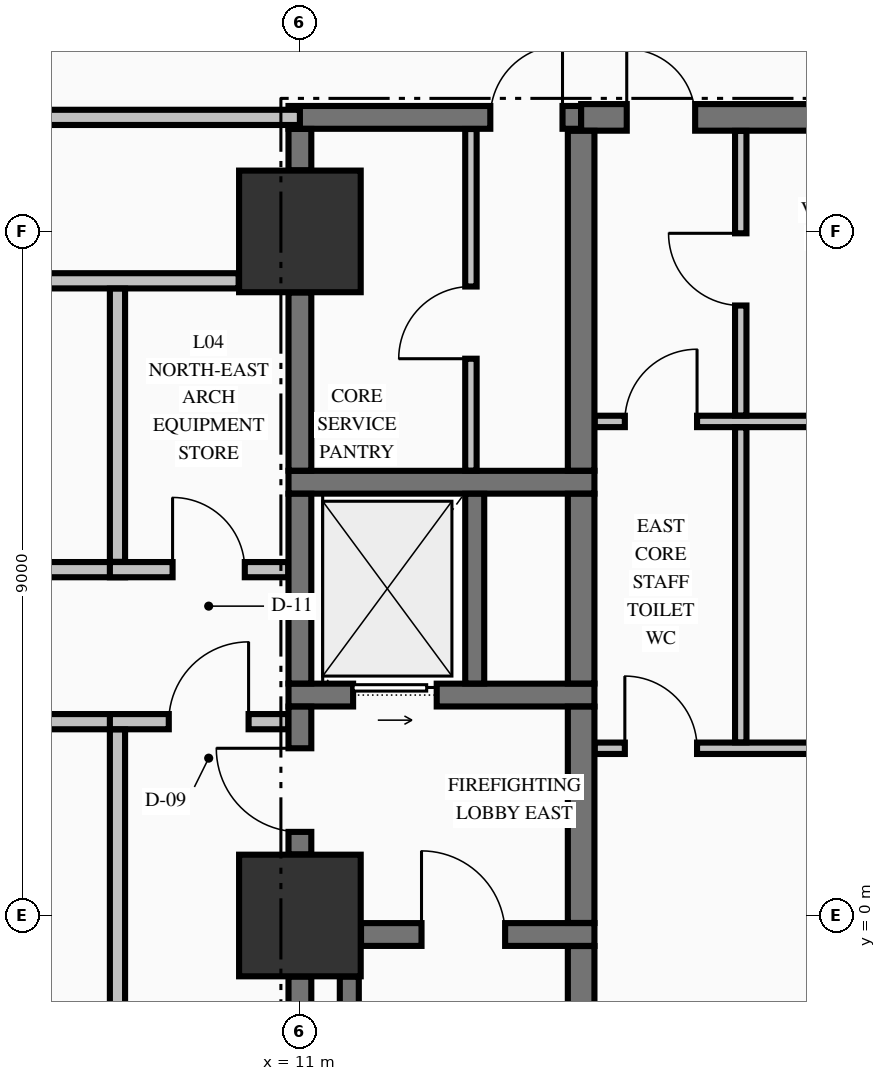
"""IFC4 building model, lengths in metres.
Left out: names, types, materials, properties, quantities, classifications, styles, units other than length and angle.
Written with IfcOpenShell. Run it as: python <this file> out.ifc"""

import sys

from ifc_helpers import new_model, si_unit, direction, frame, frame_2d, origin, origin_2d, place, context, subcontext, project, spatial, rectangle, extrude, element, fill, save


model = new_model("IFC4")
c1 = context("Model", 3, precision=1e-05, world=origin(), true_north=direction((0.0, 1.0)))
c2 = subcontext(c1, "Body", "Model", "MODEL_VIEW")
j1 = project(units=[si_unit("LENGTHUNIT", "METRE"), si_unit("PLANEANGLEUNIT", "RADIAN")], contexts=[c1])
p1 = place(None, origin())
s1 = spatial("IfcSite", under=j1, at=p1, CompositionType="ELEMENT")
p2 = place(p1, origin())
s2 = spatial("IfcBuilding", under=s1, at=p2, CompositionType="ELEMENT")
p3 = place(p2, frame((0.0, 0.0, 21.76)))
s3 = spatial("IfcBuildingStorey", under=s2, at=p3, CompositionType="ELEMENT", Elevation=21.76)
for number, where, z_axis, x_axis in (
    (1, (11.0, 0.0, -0.45), (0.0, 0.0, 1.0), (1.0, 0.0, 0.0)),
    (2, (11.0, 9.0, -0.45), (0.0, 0.0, 1.0), (1.0, 0.0, 0.0)),
):
    element("IfcColumn", number, at=place(p3, frame(where, z_axis=z_axis, x_axis=x_axis)), inside=s3, PredefinedType="COLUMN", context=c2, shape_type="SweptSolid", body=[
        extrude(rectangle(XDim=1.6, YDim=1.6, at=origin_2d()), origin(), (0.0, 0.0, 1.0), 5.44),
    ])
p4 = place(p3, frame((11.804, -0.25, 0.0), z_axis=(0.0, 0.0, 1.0), x_axis=(1.0, 0.0, 0.0)))
e3 = element("IfcWall", 3, at=p4, inside=s3, PredefinedType="SHEAR", context=c2, shape_type="SweptSolid", body=[
    extrude(rectangle(XDim=3.071, YDim=0.3, at=frame_2d((1.536, 0.0))), origin(), (0.0, 0.0, 1.0), 4.99),
])
p5 = place(p4, frame((0.796, 0.0, 0.0)))
e4 = element("IfcOpeningElement", 4, at=p5, cuts=e3, PredefinedType="OPENING", context=c2, shape_type="SweptSolid", body=[
    extrude(rectangle(XDim=1.1, YDim=2.15, at=frame_2d((0.55, 1.075))), frame((0.0, 0.16, 0.0), z_axis=(0.0, -1.0, 0.0), x_axis=(1.0, 0.0, 0.0)), (0.0, 0.0, 1.0), 0.32),
])
p6 = place(p3, frame((10.85, 2.9, 0.0), z_axis=(0.0, 0.0, 1.0), x_axis=(1.0, 0.0, 0.0)))
e5 = element("IfcWall", 5, at=p6, inside=s3, PredefinedType="SHEAR", context=c2, shape_type="SweptSolid", body=[
    extrude(rectangle(XDim=4.025, YDim=0.3, at=frame_2d((2.012, 0.0))), origin(), (0.0, 0.0, 1.0), 4.99),
])
p7 = place(p6, frame((0.85, 0.0, 0.0)))
e6 = element("IfcOpeningElement", 6, at=p7, cuts=e5, PredefinedType="OPENING", context=c2, shape_type="SweptSolid", body=[
    extrude(rectangle(XDim=1.1, YDim=2.2, at=frame_2d((0.55, 1.1))), frame((0.0, 0.16, 0.0), z_axis=(0.0, -1.0, 0.0), x_axis=(1.0, 0.0, 0.0)), (0.0, 0.0, 1.0), 0.32),
])
p8 = place(p3, frame((10.85, 5.7, 0.0), z_axis=(0.0, 0.0, 1.0), x_axis=(1.0, 0.0, 0.0)))
e7 = element("IfcWall", 7, at=p8, inside=s3, PredefinedType="SHEAR", context=c2, shape_type="SweptSolid", body=[
    extrude(rectangle(XDim=4.025, YDim=0.3, at=frame_2d((2.012, 0.0))), origin(), (0.0, 0.0, 1.0), 4.99),
])
p9 = place(p3, frame((10.85, 10.5, 0.0), z_axis=(0.0, 0.0, 1.0), x_axis=(1.0, 0.0, 0.0)))
e8 = element("IfcWall", 8, at=p9, inside=s3, PredefinedType="SHEAR", context=c2, shape_type="SweptSolid", body=[
    extrude(rectangle(XDim=3.85, YDim=0.3, at=frame_2d((1.925, 0.0))), origin(), (0.0, 0.0, 1.0), 4.99),
])
p10 = place(p9, frame((2.655, 0.0, 0.0)))
e9 = element("IfcOpeningElement", 9, at=p10, cuts=e8, PredefinedType="OPENING", context=c2, shape_type="SweptSolid", body=[
    extrude(rectangle(XDim=0.95, YDim=2.15, at=frame_2d((0.475, 1.075))), frame((0.0, 0.16, 0.0), z_axis=(0.0, -1.0, 0.0), x_axis=(1.0, 0.0, 0.0)), (0.0, 0.0, 1.0), 0.32),
])
p11 = place(p3, frame((14.7, 10.5, 0.0), z_axis=(0.0, 0.0, 1.0), x_axis=(1.0, 0.0, 0.0)))
e10 = element("IfcWall", 10, at=p11, inside=s3, PredefinedType="SHEAR", context=c2, shape_type="SweptSolid", body=[
    extrude(rectangle(XDim=5.475, YDim=0.35, at=frame_2d((2.738, 0.0))), origin(), (0.0, 0.0, 1.0), 4.99),
])
p12 = place(p11, frame((0.6, 0.0, 0.0)))
e11 = element("IfcOpeningElement", 11, at=p12, cuts=e10, PredefinedType="OPENING", context=c2, shape_type="SweptSolid", body=[
    extrude(rectangle(XDim=0.9, YDim=2.15, at=frame_2d((0.45, 1.075))), frame((0.0, 0.185, 0.0), z_axis=(0.0, -1.0, 0.0), x_axis=(1.0, 0.0, 0.0)), (0.0, 0.0, 1.0), 0.37),
])
p13 = place(p3, frame((14.878, 2.2, 0.0), z_axis=(0.0, 0.0, 1.0), x_axis=(1.0, 0.0, 0.0)))
e12 = element("IfcWall", 12, at=p13, inside=s3, PredefinedType="PARTITIONING", context=c2, shape_type="SweptSolid", body=[
    extrude(rectangle(XDim=4.944, YDim=0.15, at=frame_2d((2.472, 0.0))), origin(), (0.0, 0.0, 1.0), 4.99),
])
p14 = place(p13, frame((0.397, 0.0, 0.0)))
e13 = element("IfcOpeningElement", 13, at=p14, cuts=e12, PredefinedType="OPENING", context=c2, shape_type="SweptSolid", body=[
    extrude(rectangle(XDim=0.95, YDim=2.15, at=frame_2d((0.475, 1.075))), frame((0.0, 0.085, 0.0), z_axis=(0.0, -1.0, 0.0), x_axis=(1.0, 0.0, 0.0)), (0.0, 0.0, 1.0), 0.17),
])
p15 = place(p3, frame((-8.7, 2.55, 0.0), z_axis=(0.0, 0.0, 1.0), x_axis=(1.0, 0.0, 0.0)))
e14 = element("IfcWall", 14, at=p15, inside=s3, PredefinedType="PARTITIONING", context=c2, shape_type="SweptSolid", body=[
    extrude(rectangle(XDim=17.4, YDim=0.2, at=frame_2d((8.7, 0.0))), origin(), (0.0, 0.0, 1.0), 4.99),
])
p16 = place(p15, frame((2.65, 0.0, 0.0)))
e15 = element("IfcOpeningElement", 15, at=p16, cuts=e14, PredefinedType="OPENING", context=c2, shape_type="SweptSolid", body=[
    extrude(rectangle(XDim=1.1, YDim=2.15, at=frame_2d((0.55, 1.075))), frame((0.0, 0.11, 0.0), z_axis=(0.0, -1.0, 0.0), x_axis=(1.0, 0.0, 0.0)), (0.0, 0.0, 1.0), 0.22),
])
p17 = place(p15, frame((5.95, 0.0, 0.0)))
e16 = element("IfcOpeningElement", 16, at=p17, cuts=e14, PredefinedType="OPENING", context=c2, shape_type="SweptSolid", body=[
    extrude(rectangle(XDim=1.2, YDim=2.15, at=frame_2d((0.6, 1.075))), frame((0.0, 0.11, 0.0), z_axis=(0.0, -1.0, 0.0), x_axis=(1.0, 0.0, 0.0)), (0.0, 0.0, 1.0), 0.22),
])
p18 = place(p3, frame((8.5, 2.55, 0.0), z_axis=(0.0, 0.0, 1.0), x_axis=(1.0, 0.0, 0.0)))
e17 = element("IfcWall", 17, at=p18, inside=s3, PredefinedType="PARTITIONING", context=c2, shape_type="SweptSolid", body=[
    extrude(rectangle(XDim=2.347, YDim=0.2, at=frame_2d((1.173, 0.0))), origin(), (0.0, 0.0, 1.0), 4.99),
])
p19 = place(p18, frame((0.775, 0.0, 0.0)))
e18 = element("IfcOpeningElement", 18, at=p19, cuts=e17, PredefinedType="OPENING", context=c2, shape_type="SweptSolid", body=[
    extrude(rectangle(XDim=1.05, YDim=2.15, at=frame_2d((0.525, 1.075))), frame((0.0, 0.11, 0.0), z_axis=(0.0, -1.0, 0.0), x_axis=(1.0, 0.0, 0.0)), (0.0, 0.0, 1.0), 0.22),
])
p20 = place(p3, frame((-8.7, 4.55, 0.0), z_axis=(0.0, 0.0, 1.0), x_axis=(1.0, 0.0, 0.0)))
e19 = element("IfcWall", 19, at=p20, inside=s3, PredefinedType="PARTITIONING", context=c2, shape_type="SweptSolid", body=[
    extrude(rectangle(XDim=17.4, YDim=0.2, at=frame_2d((8.7, 0.0))), origin(), (0.0, 0.0, 1.0), 4.99),
])
p21 = place(p20, frame((2.65, 0.0, 0.0)))
e20 = element("IfcOpeningElement", 20, at=p21, cuts=e19, PredefinedType="OPENING", context=c2, shape_type="SweptSolid", body=[
    extrude(rectangle(XDim=1.1, YDim=2.15, at=frame_2d((0.55, 1.075))), frame((0.0, 0.11, 0.0), z_axis=(0.0, -1.0, 0.0), x_axis=(1.0, 0.0, 0.0)), (0.0, 0.0, 1.0), 0.22),
])
p22 = place(p20, frame((0.575, 0.0, 0.0)))
e21 = element("IfcOpeningElement", 21, at=p22, cuts=e19, PredefinedType="OPENING", context=c2, shape_type="SweptSolid", body=[
    extrude(rectangle(XDim=0.95, YDim=2.15, at=frame_2d((0.475, 1.075))), frame((0.0, 0.11, 0.0), z_axis=(0.0, -1.0, 0.0), x_axis=(1.0, 0.0, 0.0)), (0.0, 0.0, 1.0), 0.22),
])
p23 = place(p20, frame((6.0, 0.0, 0.0)))
e22 = element("IfcOpeningElement", 22, at=p23, cuts=e19, PredefinedType="OPENING", context=c2, shape_type="SweptSolid", body=[
    extrude(rectangle(XDim=1.1, YDim=2.15, at=frame_2d((0.55, 1.075))), frame((0.0, 0.11, 0.0), z_axis=(0.0, -1.0, 0.0), x_axis=(1.0, 0.0, 0.0)), (0.0, 0.0, 1.0), 0.22),
])
p24 = place(p20, frame((12.4, 0.0, 0.0)))
e23 = element("IfcOpeningElement", 23, at=p24, cuts=e19, PredefinedType="OPENING", context=c2, shape_type="SweptSolid", body=[
    extrude(rectangle(XDim=1.2, YDim=2.15, at=frame_2d((0.6, 1.075))), frame((0.0, 0.11, 0.0), z_axis=(0.0, -1.0, 0.0), x_axis=(1.0, 0.0, 0.0)), (0.0, 0.0, 1.0), 0.22),
])
p25 = place(p3, frame((8.5, 4.55, 0.0), z_axis=(0.0, 0.0, 1.0), x_axis=(1.0, 0.0, 0.0)))
e24 = element("IfcWall", 24, at=p25, inside=s3, PredefinedType="PARTITIONING", context=c2, shape_type="SweptSolid", body=[
    extrude(rectangle(XDim=2.347, YDim=0.2, at=frame_2d((1.173, 0.0))), origin(), (0.0, 0.0, 1.0), 4.99),
])
p26 = place(p25, frame((0.825, 0.0, 0.0)))
e25 = element("IfcOpeningElement", 25, at=p26, cuts=e24, PredefinedType="OPENING", context=c2, shape_type="SweptSolid", body=[
    extrude(rectangle(XDim=0.95, YDim=2.15, at=frame_2d((0.475, 1.075))), frame((0.0, 0.11, 0.0), z_axis=(0.0, -1.0, 0.0), x_axis=(1.0, 0.0, 0.0)), (0.0, 0.0, 1.0), 0.22),
])
p27 = place(p3, frame((14.878, 6.5, 0.0), z_axis=(0.0, 0.0, 1.0), x_axis=(1.0, 0.0, 0.0)))
e26 = element("IfcWall", 26, at=p27, inside=s3, PredefinedType="PARTITIONING", context=c2, shape_type="SweptSolid", body=[
    extrude(rectangle(XDim=4.944, YDim=0.15, at=frame_2d((2.472, 0.0))), origin(), (0.0, 0.0, 1.0), 4.99),
])
p28 = place(p27, frame((0.397, 0.0, 0.0)))
e27 = element("IfcOpeningElement", 27, at=p28, cuts=e26, PredefinedType="OPENING", context=c2, shape_type="SweptSolid", body=[
    extrude(rectangle(XDim=0.95, YDim=2.15, at=frame_2d((0.475, 1.075))), frame((0.0, 0.085, 0.0), z_axis=(0.0, -1.0, 0.0), x_axis=(1.0, 0.0, 0.0)), (0.0, 0.0, 1.0), 0.17),
])
p29 = place(p27, frame((3.047, 0.0, 0.0)))
e28 = element("IfcOpeningElement", 28, at=p29, cuts=e26, PredefinedType="OPENING", context=c2, shape_type="SweptSolid", body=[
    extrude(rectangle(XDim=0.95, YDim=2.15, at=frame_2d((0.475, 1.075))), frame((0.0, 0.085, 0.0), z_axis=(0.0, -1.0, 0.0), x_axis=(1.0, 0.0, 0.0)), (0.0, 0.0, 1.0), 0.17),
])
p30 = place(p3, frame((-4.4, 8.35, 0.0), z_axis=(0.0, 0.0, 1.0), x_axis=(1.0, 0.0, 0.0)))
e29 = element("IfcWall", 29, at=p30, inside=s3, PredefinedType="PARTITIONING", context=c2, shape_type="SweptSolid", body=[
    extrude(rectangle(XDim=14.594, YDim=0.2, at=frame_2d((7.297, 0.0))), origin(), (0.0, 0.0, 1.0), 3.332),
])
p31 = place(p3, frame((-11.0, 10.5, 0.0), z_axis=(0.0, 0.0, 1.0), x_axis=(1.0, 0.0, 0.0)))
e30 = element("IfcWall", 30, at=p31, inside=s3, PredefinedType="PARTITIONING", context=c2, shape_type="SweptSolid", body=[
    extrude(rectangle(XDim=22.0, YDim=0.2, at=frame_2d((11.0, 0.0))), origin(), (0.0, 0.0, 1.0), 3.332),
])
p32 = place(p31, frame((4.95, 0.0, 0.0)))
e31 = element("IfcOpeningElement", 31, at=p32, cuts=e30, PredefinedType="OPENING", context=c2, shape_type="SweptSolid", body=[
    extrude(rectangle(XDim=1.1, YDim=2.15, at=frame_2d((0.55, 1.075))), frame((0.0, 0.11, 0.0), z_axis=(0.0, -1.0, 0.0), x_axis=(1.0, 0.0, 0.0)), (0.0, 0.0, 1.0), 0.22),
])
p33 = place(p31, frame((15.975, 0.0, 0.0)))
e32 = element("IfcOpeningElement", 32, at=p33, cuts=e30, PredefinedType="OPENING", context=c2, shape_type="SweptSolid", body=[
    extrude(rectangle(XDim=1.05, YDim=2.15, at=frame_2d((0.525, 1.075))), frame((0.0, 0.11, 0.0), z_axis=(0.0, -1.0, 0.0), x_axis=(1.0, 0.0, 0.0)), (0.0, 0.0, 1.0), 0.22),
])
p34 = place(p3, frame((11.0, -8.196, 0.0), z_axis=(0.0, 0.0, 1.0), x_axis=(0.0, 1.0, 0.0)))
e33 = element("IfcWall", 33, at=p34, inside=s3, PredefinedType="SHEAR", context=c2, shape_type="SweptSolid", body=[
    extrude(rectangle(XDim=7.392, YDim=0.3, at=frame_2d((3.696, 0.0))), origin(), (0.0, 0.0, 1.0), 4.99),
])
p35 = place(p3, frame((11.0, 0.804, 0.0), z_axis=(0.0, 0.0, 1.0), x_axis=(0.0, 1.0, 0.0)))
e34 = element("IfcWall", 34, at=p35, inside=s3, PredefinedType="SHEAR", context=c2, shape_type="SweptSolid", body=[
    extrude(rectangle(XDim=1.944, YDim=0.3, at=frame_2d((0.972, 0.0))), origin(), (0.0, 0.0, 1.0), 4.99),
])
p36 = place(p35, frame((0.296, 0.0, 0.0)))
e35 = element("IfcOpeningElement", 35, at=p36, cuts=e34, PredefinedType="OPENING", context=c2, shape_type="SweptSolid", body=[
    extrude(rectangle(XDim=1.1, YDim=2.15, at=frame_2d((0.55, 1.075))), frame((0.0, 0.16, 0.0), z_axis=(0.0, -1.0, 0.0), x_axis=(1.0, 0.0, 0.0)), (0.0, 0.0, 1.0), 0.32),
])
p37 = place(p3, frame((11.0, 3.052, 0.0), z_axis=(0.0, 0.0, 1.0), x_axis=(0.0, 1.0, 0.0)))
e36 = element("IfcWall", 36, at=p37, inside=s3, PredefinedType="SHEAR", context=c2, shape_type="SweptSolid", body=[
    extrude(rectangle(XDim=2.496, YDim=0.3, at=frame_2d((1.248, 0.0))), origin(), (0.0, 0.0, 1.0), 4.99),
])
p38 = place(p3, frame((11.0, 5.852, 0.0), z_axis=(0.0, 0.0, 1.0), x_axis=(0.0, 1.0, 0.0)))
e37 = element("IfcWall", 37, at=p38, inside=s3, PredefinedType="SHEAR", context=c2, shape_type="SweptSolid", body=[
    extrude(rectangle(XDim=2.344, YDim=0.3, at=frame_2d((1.172, 0.0))), origin(), (0.0, 0.0, 1.0), 4.99),
])
p39 = place(p3, frame((11.0, 9.804, 0.0), z_axis=(0.0, 0.0, 1.0), x_axis=(0.0, 1.0, 0.0)))
e38 = element("IfcWall", 38, at=p39, inside=s3, PredefinedType="SHEAR", context=c2, shape_type="SweptSolid", body=[
    extrude(rectangle(XDim=0.544, YDim=0.3, at=frame_2d((0.272, 0.0))), origin(), (0.0, 0.0, 1.0), 4.99),
])
p40 = place(p3, frame((11.65, -8.196, 0.0), z_axis=(0.0, 0.0, 1.0), x_axis=(0.0, 1.0, 0.0)))
e39 = element("IfcWall", 39, at=p40, inside=s3, PredefinedType="SOLIDWALL", context=c2, shape_type="SweptSolid", body=[
    extrude(rectangle(XDim=7.392, YDim=0.25, at=frame_2d((3.696, 0.0))), origin(), (0.0, 0.0, 1.0), 4.99),
])
p41 = place(p3, frame((13.3, 3.052, 0.0), z_axis=(0.0, 0.0, 1.0), x_axis=(0.0, 1.0, 0.0)))
e40 = element("IfcWall", 40, at=p41, inside=s3, PredefinedType="SOLIDWALL", context=c2, shape_type="SweptSolid", body=[
    extrude(rectangle(XDim=2.496, YDim=0.25, at=frame_2d((1.248, 0.0))), origin(), (0.0, 0.0, 1.0), 4.99),
])
p42 = place(p3, frame((14.7, -9.773, 0.0), z_axis=(0.0, 0.0, 1.0), x_axis=(0.0, 1.0, 0.0)))
e41 = element("IfcWall", 41, at=p42, inside=s3, PredefinedType="SHEAR", context=c2, shape_type="SweptSolid", body=[
    extrude(rectangle(XDim=9.371, YDim=0.35, at=frame_2d((4.686, 0.0))), origin(), (0.0, 0.0, 1.0), 4.99),
])
p43 = place(p3, frame((14.7, -0.098, 0.0), z_axis=(0.0, 0.0, 1.0), x_axis=(0.0, 1.0, 0.0)))
e42 = element("IfcWall", 42, at=p43, inside=s3, PredefinedType="SHEAR", context=c2, shape_type="SweptSolid", body=[
    extrude(rectangle(XDim=2.846, YDim=0.35, at=frame_2d((1.423, 0.0))), origin(), (0.0, 0.0, 1.0), 4.99),
])
p44 = place(p3, frame((14.7, 3.052, 0.0), z_axis=(0.0, 0.0, 1.0), x_axis=(0.0, 1.0, 0.0)))
e43 = element("IfcWall", 43, at=p44, inside=s3, PredefinedType="SHEAR", context=c2, shape_type="SweptSolid", body=[
    extrude(rectangle(XDim=2.496, YDim=0.35, at=frame_2d((1.248, 0.0))), origin(), (0.0, 0.0, 1.0), 4.99),
])
p45 = place(p3, frame((14.7, 5.852, 0.0), z_axis=(0.0, 0.0, 1.0), x_axis=(0.0, 1.0, 0.0)))
e44 = element("IfcWall", 44, at=p45, inside=s3, PredefinedType="SHEAR", context=c2, shape_type="SweptSolid", body=[
    extrude(rectangle(XDim=4.471, YDim=0.35, at=frame_2d((2.235, 0.0))), origin(), (0.0, 0.0, 1.0), 4.99),
])
p46 = place(p3, frame((8.6, -8.247, 0.0), z_axis=(0.0, 0.0, 1.0), x_axis=(0.0, 1.0, 0.0)))
e45 = element("IfcWall", 45, at=p46, inside=s3, PredefinedType="PARTITIONING", context=c2, shape_type="SweptSolid", body=[
    extrude(rectangle(XDim=10.694, YDim=0.2, at=frame_2d((5.347, 0.0))), origin(), (0.0, 0.0, 1.0), 4.99),
])
p47 = place(p46, frame((4.547, 0.0, 0.0)))
e46 = element("IfcOpeningElement", 46, at=p47, cuts=e45, PredefinedType="OPENING", context=c2, shape_type="SweptSolid", body=[
    extrude(rectangle(XDim=1.4, YDim=2.2, at=frame_2d((0.7, 1.1))), frame((0.0, 0.11, 0.0), z_axis=(0.0, -1.0, 0.0), x_axis=(1.0, 0.0, 0.0)), (0.0, 0.0, 1.0), 0.22),
])
p48 = place(p3, frame((8.6, 4.653, 0.0), z_axis=(0.0, 0.0, 1.0), x_axis=(0.0, 1.0, 0.0)))
e47 = element("IfcWall", 47, at=p48, inside=s3, PredefinedType="PARTITIONING", context=c2, shape_type="SweptSolid", body=[
    extrude(rectangle(XDim=3.594, YDim=0.2, at=frame_2d((1.797, 0.0))), origin(), (0.0, 0.0, 1.0), 4.99),
])
p49 = place(p3, frame((13.25, 5.853, 0.0), z_axis=(0.0, 0.0, 1.0), x_axis=(0.0, 1.0, 0.0)))
e48 = element("IfcWall", 48, at=p49, inside=s3, PredefinedType="PARTITIONING", context=c2, shape_type="SweptSolid", body=[
    extrude(rectangle(XDim=4.494, YDim=0.15, at=frame_2d((2.247, 0.0))), origin(), (0.0, 0.0, 1.0), 4.99),
])
p50 = place(p49, frame((1.472, 0.0, 0.0)))
e49 = element("IfcOpeningElement", 49, at=p50, cuts=e48, PredefinedType="OPENING", context=c2, shape_type="SweptSolid", body=[
    extrude(rectangle(XDim=0.95, YDim=2.15, at=frame_2d((0.475, 1.075))), frame((0.0, 0.085, 0.0), z_axis=(0.0, -1.0, 0.0), x_axis=(1.0, 0.0, 0.0)), (0.0, 0.0, 1.0), 0.17),
])
p51 = place(p3, frame((16.8, 2.278, 0.0), z_axis=(0.0, 0.0, 1.0), x_axis=(0.0, 1.0, 0.0)))
e50 = element("IfcWall", 50, at=p51, inside=s3, PredefinedType="PARTITIONING", context=c2, shape_type="SweptSolid", body=[
    extrude(rectangle(XDim=4.144, YDim=0.15, at=frame_2d((2.072, 0.0))), origin(), (0.0, 0.0, 1.0), 4.99),
])
p52 = place(p3, frame((16.8, 6.578, 0.0), z_axis=(0.0, 0.0, 1.0), x_axis=(0.0, 1.0, 0.0)))
e51 = element("IfcWall", 51, at=p52, inside=s3, PredefinedType="PARTITIONING", context=c2, shape_type="SweptSolid", body=[
    extrude(rectangle(XDim=3.744, YDim=0.15, at=frame_2d((1.872, 0.0))), origin(), (0.0, 0.0, 1.0), 4.99),
])
p53 = place(p52, frame((1.447, 0.0, 0.0)))
e52 = element("IfcOpeningElement", 52, at=p53, cuts=e51, PredefinedType="OPENING", context=c2, shape_type="SweptSolid", body=[
    extrude(rectangle(XDim=0.95, YDim=2.15, at=frame_2d((0.475, 1.075))), frame((0.0, 0.085, 0.0), z_axis=(0.0, -1.0, 0.0), x_axis=(1.0, 0.0, 0.0)), (0.0, 0.0, 1.0), 0.17),
])
p54 = place(p5, origin())
e53 = element("IfcDoor", 53, at=p54, inside=s3, OperationType="SINGLE_SWING_LEFT", PredefinedType="DOOR", context=c2, shape_type="SweptSolid", body=[
    extrude(rectangle(XDim=1.1, YDim=2.15, at=frame_2d((0.55, 1.075))), frame((0.0, 0.025, 0.0), z_axis=(0.0, -1.0, 0.0), x_axis=(1.0, 0.0, 0.0)), (0.0, 0.0, 1.0), 0.05),
])
fill(e4, e53)
p55 = place(p36, origin())
e54 = element("IfcDoor", 54, at=p55, inside=s3, OperationType="SINGLE_SWING_RIGHT", PredefinedType="DOOR", context=c2, shape_type="SweptSolid", body=[
    extrude(rectangle(XDim=1.1, YDim=2.15, at=frame_2d((0.55, 1.075))), frame((0.0, 0.025, 0.0), z_axis=(0.0, -1.0, 0.0), x_axis=(1.0, 0.0, 0.0)), (0.0, 0.0, 1.0), 0.05),
])
fill(e35, e54)
p56 = place(p7, origin())
e55 = element("IfcDoor", 55, at=p56, inside=s3, OperationType="SLIDING_TO_RIGHT", PredefinedType="DOOR", context=c2, shape_type="SweptSolid", body=[
    extrude(rectangle(XDim=1.1, YDim=2.2, at=frame_2d((0.55, 1.1))), frame((0.0, 0.025, 0.0), z_axis=(0.0, -1.0, 0.0), x_axis=(1.0, 0.0, 0.0)), (0.0, 0.0, 1.0), 0.05),
])
fill(e6, e55)
p57 = place(p10, origin())
e56 = element("IfcDoor", 56, at=p57, inside=s3, OperationType="SINGLE_SWING_RIGHT", PredefinedType="DOOR", context=c2, shape_type="SweptSolid", body=[
    extrude(rectangle(XDim=0.95, YDim=2.15, at=frame_2d((0.475, 1.075))), frame((0.0, 0.025, 0.0), z_axis=(0.0, -1.0, 0.0), x_axis=(1.0, 0.0, 0.0)), (0.0, 0.0, 1.0), 0.05),
])
fill(e9, e56)
p58 = place(p50, origin())
e57 = element("IfcDoor", 57, at=p58, inside=s3, OperationType="SINGLE_SWING_LEFT", PredefinedType="DOOR", context=c2, shape_type="SweptSolid", body=[
    extrude(rectangle(XDim=0.95, YDim=2.15, at=frame_2d((0.475, 1.075))), frame((0.0, 0.025, 0.0), z_axis=(0.0, -1.0, 0.0), x_axis=(1.0, 0.0, 0.0)), (0.0, 0.0, 1.0), 0.05),
])
fill(e49, e57)
p59 = place(p12, origin())
e58 = element("IfcDoor", 58, at=p59, inside=s3, OperationType="SINGLE_SWING_LEFT", PredefinedType="DOOR", context=c2, shape_type="SweptSolid", body=[
    extrude(rectangle(XDim=0.9, YDim=2.15, at=frame_2d((0.45, 1.075))), frame((0.0, 0.025, 0.0), z_axis=(0.0, -1.0, 0.0), x_axis=(1.0, 0.0, 0.0)), (0.0, 0.0, 1.0), 0.05),
])
fill(e11, e58)
p60 = place(p28, origin())
e59 = element("IfcDoor", 59, at=p60, inside=s3, OperationType="SINGLE_SWING_RIGHT", PredefinedType="DOOR", context=c2, shape_type="SweptSolid", body=[
    extrude(rectangle(XDim=0.95, YDim=2.15, at=frame_2d((0.475, 1.075))), frame((0.0, 0.025, 0.0), z_axis=(0.0, -1.0, 0.0), x_axis=(1.0, 0.0, 0.0)), (0.0, 0.0, 1.0), 0.05),
])
fill(e27, e59)
p61 = place(p14, origin())
e60 = element("IfcDoor", 60, at=p61, inside=s3, OperationType="SINGLE_SWING_LEFT", PredefinedType="DOOR", context=c2, shape_type="SweptSolid", body=[
    extrude(rectangle(XDim=0.95, YDim=2.15, at=frame_2d((0.475, 1.075))), frame((0.0, 0.025, 0.0), z_axis=(0.0, -1.0, 0.0), x_axis=(1.0, 0.0, 0.0)), (0.0, 0.0, 1.0), 0.05),
])
fill(e13, e60)
p62 = place(p53, origin())
e61 = element("IfcDoor", 61, at=p62, inside=s3, OperationType="SINGLE_SWING_RIGHT", PredefinedType="DOOR", context=c2, shape_type="SweptSolid", body=[
    extrude(rectangle(XDim=0.95, YDim=2.15, at=frame_2d((0.475, 1.075))), frame((0.0, 0.025, 0.0), z_axis=(0.0, -1.0, 0.0), x_axis=(1.0, 0.0, 0.0)), (0.0, 0.0, 1.0), 0.05),
])
fill(e52, e61)
p63 = place(p19, origin())
e62 = element("IfcDoor", 62, at=p63, inside=s3, OperationType="SINGLE_SWING_RIGHT", PredefinedType="DOOR", context=c2, shape_type="SweptSolid", body=[
    extrude(rectangle(XDim=1.05, YDim=2.15, at=frame_2d((0.525, 1.075))), frame((0.0, 0.025, 0.0), z_axis=(0.0, -1.0, 0.0), x_axis=(1.0, 0.0, 0.0)), (0.0, 0.0, 1.0), 0.05),
])
fill(e18, e62)
p64 = place(p26, origin())
e63 = element("IfcDoor", 63, at=p64, inside=s3, OperationType="SINGLE_SWING_LEFT", PredefinedType="DOOR", context=c2, shape_type="SweptSolid", body=[
    extrude(rectangle(XDim=0.95, YDim=2.15, at=frame_2d((0.475, 1.075))), frame((0.0, 0.025, 0.0), z_axis=(0.0, -1.0, 0.0), x_axis=(1.0, 0.0, 0.0)), (0.0, 0.0, 1.0), 0.05),
])
fill(e25, e63)
save(model, sys.argv[1])
